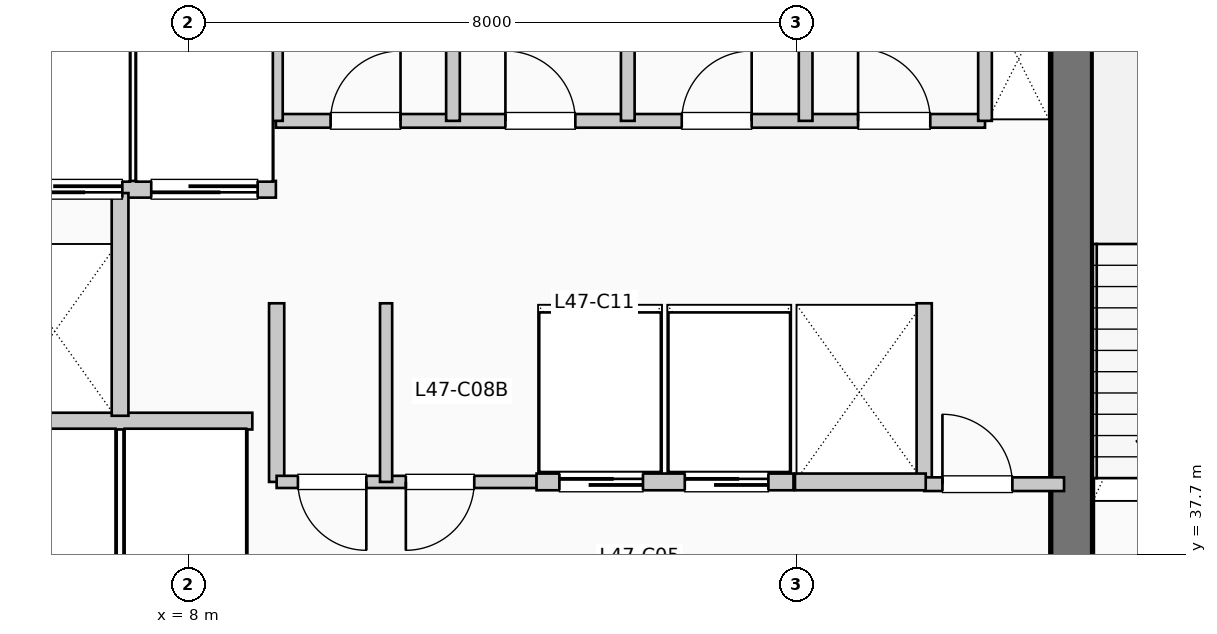
"""IFC4 building model, lengths in metres.
Left out: names, types, materials, properties, quantities, classifications, styles, units other than length and angle.
Written with IfcOpenShell. Run it as: python <this file> out.ifc"""

import sys

from ifc_helpers import new_model, si_unit, direction, frame, frame_2d, origin, place, context, subcontext, project, spatial, rectangle, extrude, element, fill, save


model = new_model("IFC4")
c1 = context("Model", 3, precision=1e-05, world=origin(), true_north=direction((0.0, 1.0)))
c2 = subcontext(c1, "Body", "Model", "MODEL_VIEW")
j1 = project(units=[si_unit("LENGTHUNIT", "METRE"), si_unit("PLANEANGLEUNIT", "RADIAN")], contexts=[c1])
p1 = place(None, origin())
s1 = spatial("IfcSite", under=j1, at=p1, CompositionType="ELEMENT")
p2 = place(p1, origin())
s2 = spatial("IfcBuilding", under=s1, at=p2, CompositionType="ELEMENT")
p3 = place(p2, frame((0.0, 0.0, 195.36)))
s3 = spatial("IfcBuildingStorey", under=s2, at=p3, CompositionType="ELEMENT", Elevation=195.36)
p4 = place(p3, frame((19.62, 37.15, 0.0), z_axis=(0.0, 0.0, 1.0), x_axis=(0.0, 1.0, 0.0)))
e1 = element("IfcWall", 1, at=p4, inside=s3, PredefinedType="SHEAR", context=c2, shape_type="SweptSolid", body=[
    extrude(rectangle(XDim=7.89, YDim=0.55, at=frame_2d((3.945, 0.0))), origin(), (0.0, 0.0, 1.0), 3.96),
])
p5 = place(p3, frame((5.38, 39.45, 0.0), z_axis=(0.0, 0.0, 1.0), x_axis=(1.0, 0.0, 0.0)))
e2 = element("IfcWall", 2, at=p5, inside=s3, PredefinedType="PARTITIONING", context=c2, shape_type="SweptSolid", body=[
    extrude(rectangle(XDim=3.46, YDim=0.22, at=frame_2d((1.73, 0.0))), origin(), (0.0, 0.0, 1.0), 3.71),
])
p6 = place(p3, frame((5.38, 42.5, 0.0), z_axis=(0.0, 0.0, 1.0), x_axis=(1.0, 0.0, 0.0)))
e3 = element("IfcWall", 3, at=p6, inside=s3, PredefinedType="PARTITIONING", context=c2, shape_type="SweptSolid", body=[
    extrude(rectangle(XDim=3.77, YDim=0.22, at=frame_2d((1.885, 0.0))), origin(), (0.0, 0.0, 1.0), 3.71),
])
p7 = place(p6, frame((1.75, 0.0, 0.0), z_axis=(0.0, 0.0, 1.0), x_axis=(-1.0, 0.0, 0.0)))
e4 = element("IfcOpeningElement", 4, at=p7, cuts=e3, PredefinedType="OPENING", context=c2, shape_type="SweptSolid", body=[
    extrude(rectangle(XDim=1.4, YDim=2.2, at=frame_2d((0.7, 1.1))), frame((0.0, 0.12, 0.0), z_axis=(0.0, -1.0, 0.0), x_axis=(1.0, 0.0, 0.0)), (0.0, 0.0, 1.0), 0.24),
])
p8 = place(p6, frame((3.53, 0.0, 0.0), z_axis=(0.0, 0.0, 1.0), x_axis=(-1.0, 0.0, 0.0)))
e5 = element("IfcOpeningElement", 5, at=p8, cuts=e3, PredefinedType="OPENING", context=c2, shape_type="SweptSolid", body=[
    extrude(rectangle(XDim=1.4, YDim=2.2, at=frame_2d((0.7, 1.1))), frame((0.0, 0.12, 0.0), z_axis=(0.0, -1.0, 0.0), x_axis=(1.0, 0.0, 0.0)), (0.0, 0.0, 1.0), 0.24),
])
p9 = place(p3, frame((7.1, 39.52, 0.0), z_axis=(0.0, 0.0, 1.0), x_axis=(0.0, 1.0, 0.0)))
e6 = element("IfcWall", 6, at=p9, inside=s3, PredefinedType="PARTITIONING", context=c2, shape_type="SweptSolid", body=[
    extrude(rectangle(XDim=2.93, YDim=0.22, at=frame_2d((1.465, 0.0))), origin(), (0.0, 0.0, 1.0), 3.71),
])
for number, where, z_axis, x_axis in (
    (7, (9.16, 38.65, 0.0), (0.0, 0.0, 1.0), (0.0, 1.0, 0.0)),
    (8, (17.68, 38.65, 0.0), (0.0, 0.0, 1.0), (0.0, 1.0, 0.0)),
):
    element("IfcWall", number, at=place(p3, frame(where, z_axis=z_axis, x_axis=x_axis)), inside=s3, PredefinedType="PARTITIONING", context=c2, shape_type="SweptSolid", body=[
        extrude(rectangle(XDim=2.35, YDim=0.2, at=frame_2d((1.175, 0.0))), origin(), (0.0, 0.0, 1.0), 3.71),
    ])
p10 = place(p3, frame((17.68, 38.62, 0.0), z_axis=(0.0, 0.0, 1.0), x_axis=(1.0, 0.0, 0.0)))
e9 = element("IfcWall", 9, at=p10, inside=s3, PredefinedType="PARTITIONING", context=c2, shape_type="SweptSolid", body=[
    extrude(rectangle(XDim=1.84, YDim=0.18, at=frame_2d((0.92, 0.0))), origin(), (0.0, 0.0, 1.0), 3.71),
])
p11 = place(p10, frame((0.24, 0.0, 0.0)))
e10 = element("IfcOpeningElement", 10, at=p11, cuts=e9, PredefinedType="OPENING", context=c2, shape_type="SweptSolid", body=[
    extrude(rectangle(XDim=0.92, YDim=2.1, at=frame_2d((0.46, 1.05))), frame((0.0, 0.1, 0.0), z_axis=(0.0, -1.0, 0.0), x_axis=(1.0, 0.0, 0.0)), (0.0, 0.0, 1.0), 0.2),
])
p12 = place(p3, frame((9.16, 38.65, 0.0), z_axis=(0.0, 0.0, 1.0), x_axis=(1.0, 0.0, 0.0)))
e11 = element("IfcWall", 11, at=p12, inside=s3, PredefinedType="PARTITIONING", context=c2, shape_type="SweptSolid", body=[
    extrude(rectangle(XDim=3.42, YDim=0.16, at=frame_2d((1.71, 0.0))), origin(), (0.0, 0.0, 1.0), 3.71),
])
p13 = place(p12, frame((1.18, 0.0, 0.0), z_axis=(0.0, 0.0, 1.0), x_axis=(-1.0, 0.0, 0.0)))
e12 = element("IfcOpeningElement", 12, at=p13, cuts=e11, PredefinedType="OPENING", context=c2, shape_type="SweptSolid", body=[
    extrude(rectangle(XDim=0.9, YDim=2.15, at=frame_2d((0.45, 1.075))), frame((0.0, 0.09, 0.0), z_axis=(0.0, -1.0, 0.0), x_axis=(1.0, 0.0, 0.0)), (0.0, 0.0, 1.0), 0.18),
])
p14 = place(p12, frame((2.6, 0.0, 0.0), z_axis=(0.0, 0.0, 1.0), x_axis=(-1.0, 0.0, 0.0)))
e13 = element("IfcOpeningElement", 13, at=p14, cuts=e11, PredefinedType="OPENING", context=c2, shape_type="SweptSolid", body=[
    extrude(rectangle(XDim=0.9, YDim=2.15, at=frame_2d((0.45, 1.075))), frame((0.0, 0.09, 0.0), z_axis=(0.0, -1.0, 0.0), x_axis=(1.0, 0.0, 0.0)), (0.0, 0.0, 1.0), 0.18),
])
p15 = place(p3, frame((10.6, 38.65, 0.0), z_axis=(0.0, 0.0, 1.0), x_axis=(0.0, 1.0, 0.0)))
e14 = element("IfcWall", 14, at=p15, inside=s3, PredefinedType="PARTITIONING", context=c2, shape_type="SweptSolid", body=[
    extrude(rectangle(XDim=2.35, YDim=0.16, at=frame_2d((1.175, 0.0))), origin(), (0.0, 0.0, 1.0), 3.71),
])
p16 = place(p3, frame((12.58, 38.65, 0.0), z_axis=(0.0, 0.0, 1.0), x_axis=(1.0, 0.0, 0.0)))
e15 = element("IfcWall", 15, at=p16, inside=s3, PredefinedType="PARTITIONING", context=c2, shape_type="SweptSolid", body=[
    extrude(rectangle(XDim=3.38, YDim=0.22, at=frame_2d((1.69, 0.0))), origin(), (0.0, 0.0, 1.0), 3.71),
])
p17 = place(p16, frame((0.3, 0.0, 0.0)))
e16 = element("IfcOpeningElement", 16, at=p17, cuts=e15, PredefinedType="OPENING", context=c2, shape_type="SweptSolid", body=[
    extrude(rectangle(XDim=1.1, YDim=2.2, at=frame_2d((0.55, 1.1))), frame((0.0, 0.12, 0.0), z_axis=(0.0, -1.0, 0.0), x_axis=(1.0, 0.0, 0.0)), (0.0, 0.0, 1.0), 0.24),
])
p18 = place(p16, frame((1.95, 0.0, 0.0)))
e17 = element("IfcOpeningElement", 17, at=p18, cuts=e15, PredefinedType="OPENING", context=c2, shape_type="SweptSolid", body=[
    extrude(rectangle(XDim=1.1, YDim=2.2, at=frame_2d((0.55, 1.1))), frame((0.0, 0.12, 0.0), z_axis=(0.0, -1.0, 0.0), x_axis=(1.0, 0.0, 0.0)), (0.0, 0.0, 1.0), 0.24),
])
p19 = place(p3, frame((15.98, 38.65, 0.0), z_axis=(0.0, 0.0, 1.0), x_axis=(1.0, 0.0, 0.0)))
e18 = element("IfcWall", 18, at=p19, inside=s3, PredefinedType="PARTITIONING", context=c2, shape_type="SweptSolid", body=[
    extrude(rectangle(XDim=1.72, YDim=0.22, at=frame_2d((0.86, 0.0))), origin(), (0.0, 0.0, 1.0), 3.71),
])
p20 = place(p3, frame((9.15, 43.4, 0.0), z_axis=(0.0, 0.0, 1.0), x_axis=(1.0, 0.0, 0.0)))
e19 = element("IfcWall", 19, at=p20, inside=s3, PredefinedType="PLUMBINGWALL", context=c2, shape_type="SweptSolid", body=[
    extrude(rectangle(XDim=9.33, YDim=0.18, at=frame_2d((4.665, 0.0))), origin(), (0.0, 0.0, 1.0), 3.71),
])
p21 = place(p20, frame((0.72, 0.0, 0.0)))
e20 = element("IfcOpeningElement", 20, at=p21, cuts=e19, PredefinedType="OPENING", context=c2, shape_type="SweptSolid", body=[
    extrude(rectangle(XDim=0.92, YDim=2.1, at=frame_2d((0.46, 1.05))), frame((0.0, 0.1, 0.0), z_axis=(0.0, -1.0, 0.0), x_axis=(1.0, 0.0, 0.0)), (0.0, 0.0, 1.0), 0.2),
])
p22 = place(p20, frame((3.02, 0.0, 0.0)))
e21 = element("IfcOpeningElement", 21, at=p22, cuts=e19, PredefinedType="OPENING", context=c2, shape_type="SweptSolid", body=[
    extrude(rectangle(XDim=0.92, YDim=2.1, at=frame_2d((0.46, 1.05))), frame((0.0, 0.1, 0.0), z_axis=(0.0, -1.0, 0.0), x_axis=(1.0, 0.0, 0.0)), (0.0, 0.0, 1.0), 0.2),
])
p23 = place(p20, frame((5.34, 0.0, 0.0)))
e22 = element("IfcOpeningElement", 22, at=p23, cuts=e19, PredefinedType="OPENING", context=c2, shape_type="SweptSolid", body=[
    extrude(rectangle(XDim=0.92, YDim=2.1, at=frame_2d((0.46, 1.05))), frame((0.0, 0.1, 0.0), z_axis=(0.0, -1.0, 0.0), x_axis=(1.0, 0.0, 0.0)), (0.0, 0.0, 1.0), 0.2),
])
p24 = place(p20, frame((7.66, 0.0, 0.0)))
e23 = element("IfcOpeningElement", 23, at=p24, cuts=e19, PredefinedType="OPENING", context=c2, shape_type="SweptSolid", body=[
    extrude(rectangle(XDim=0.95, YDim=2.1, at=frame_2d((0.475, 1.05))), frame((0.0, 0.1, 0.0), z_axis=(0.0, -1.0, 0.0), x_axis=(1.0, 0.0, 0.0)), (0.0, 0.0, 1.0), 0.2),
])
for number, where, z_axis, x_axis in (
    (24, (9.15, 43.4, 0.0), (0.0, 0.0, 1.0), (0.0, 1.0, 0.0)),
    (25, (18.48, 43.4, 0.0), (0.0, 0.0, 1.0), (0.0, 1.0, 0.0)),
    (26, (11.48, 43.4, 0.0), (0.0, 0.0, 1.0), (0.0, 1.0, 0.0)),
    (27, (13.78, 43.4, 0.0), (0.0, 0.0, 1.0), (0.0, 1.0, 0.0)),
    (28, (16.12, 43.4, 0.0), (0.0, 0.0, 1.0), (0.0, 1.0, 0.0)),
):
    element("IfcWall", number, at=place(p3, frame(where, z_axis=z_axis, x_axis=x_axis)), inside=s3, PredefinedType="PLUMBINGWALL", context=c2, shape_type="SweptSolid", body=[
        extrude(rectangle(XDim=1.88, YDim=0.18, at=frame_2d((0.94, 0.0))), origin(), (0.0, 0.0, 1.0), 3.71),
    ])
p25 = place(p7, origin())
e29 = element("IfcDoor", 29, at=p25, inside=s3, OperationType="SLIDING_TO_LEFT", PredefinedType="DOOR", context=c2, shape_type="SweptSolid", body=[
    extrude(rectangle(XDim=1.4, YDim=2.2, at=frame_2d((0.7, 1.1))), frame((0.0, 0.025, 0.0), z_axis=(0.0, -1.0, 0.0), x_axis=(1.0, 0.0, 0.0)), (0.0, 0.0, 1.0), 0.05),
])
fill(e4, e29)
p26 = place(p8, origin())
e30 = element("IfcDoor", 30, at=p26, inside=s3, OperationType="SLIDING_TO_LEFT", PredefinedType="DOOR", context=c2, shape_type="SweptSolid", body=[
    extrude(rectangle(XDim=1.4, YDim=2.2, at=frame_2d((0.7, 1.1))), frame((0.0, 0.025, 0.0), z_axis=(0.0, -1.0, 0.0), x_axis=(1.0, 0.0, 0.0)), (0.0, 0.0, 1.0), 0.05),
])
fill(e5, e30)
p27 = place(p11, origin())
e31 = element("IfcDoor", 31, at=p27, inside=s3, OperationType="SINGLE_SWING_LEFT", PredefinedType="DOOR", context=c2, shape_type="SweptSolid", body=[
    extrude(rectangle(XDim=0.92, YDim=2.1, at=frame_2d((0.46, 1.05))), frame((0.0, 0.025, 0.0), z_axis=(0.0, -1.0, 0.0), x_axis=(1.0, 0.0, 0.0)), (0.0, 0.0, 1.0), 0.05),
])
fill(e10, e31)
p28 = place(p13, origin())
e32 = element("IfcDoor", 32, at=p28, inside=s3, OperationType="SINGLE_SWING_RIGHT", PredefinedType="DOOR", context=c2, shape_type="SweptSolid", body=[
    extrude(rectangle(XDim=0.9, YDim=2.15, at=frame_2d((0.45, 1.075))), frame((0.0, 0.025, 0.0), z_axis=(0.0, -1.0, 0.0), x_axis=(1.0, 0.0, 0.0)), (0.0, 0.0, 1.0), 0.05),
])
fill(e12, e32)
p29 = place(p14, origin())
e33 = element("IfcDoor", 33, at=p29, inside=s3, OperationType="SINGLE_SWING_LEFT", PredefinedType="DOOR", context=c2, shape_type="SweptSolid", body=[
    extrude(rectangle(XDim=0.9, YDim=2.15, at=frame_2d((0.45, 1.075))), frame((0.0, 0.025, 0.0), z_axis=(0.0, -1.0, 0.0), x_axis=(1.0, 0.0, 0.0)), (0.0, 0.0, 1.0), 0.05),
])
fill(e13, e33)
p30 = place(p17, origin())
e34 = element("IfcDoor", 34, at=p30, inside=s3, OperationType="SLIDING_TO_RIGHT", PredefinedType="DOOR", context=c2, shape_type="SweptSolid", body=[
    extrude(rectangle(XDim=1.1, YDim=2.2, at=frame_2d((0.55, 1.1))), frame((0.0, 0.025, 0.0), z_axis=(0.0, -1.0, 0.0), x_axis=(1.0, 0.0, 0.0)), (0.0, 0.0, 1.0), 0.05),
])
fill(e16, e34)
p31 = place(p18, origin())
e35 = element("IfcDoor", 35, at=p31, inside=s3, OperationType="SLIDING_TO_RIGHT", PredefinedType="DOOR", context=c2, shape_type="SweptSolid", body=[
    extrude(rectangle(XDim=1.1, YDim=2.2, at=frame_2d((0.55, 1.1))), frame((0.0, 0.025, 0.0), z_axis=(0.0, -1.0, 0.0), x_axis=(1.0, 0.0, 0.0)), (0.0, 0.0, 1.0), 0.05),
])
fill(e17, e35)
p32 = place(p21, origin())
e36 = element("IfcDoor", 36, at=p32, inside=s3, OperationType="SINGLE_SWING_RIGHT", PredefinedType="DOOR", context=c2, shape_type="SweptSolid", body=[
    extrude(rectangle(XDim=0.92, YDim=2.1, at=frame_2d((0.46, 1.05))), frame((0.0, 0.025, 0.0), z_axis=(0.0, -1.0, 0.0), x_axis=(1.0, 0.0, 0.0)), (0.0, 0.0, 1.0), 0.05),
])
fill(e20, e36)
p33 = place(p22, origin())
e37 = element("IfcDoor", 37, at=p33, inside=s3, OperationType="SINGLE_SWING_LEFT", PredefinedType="DOOR", context=c2, shape_type="SweptSolid", body=[
    extrude(rectangle(XDim=0.92, YDim=2.1, at=frame_2d((0.46, 1.05))), frame((0.0, 0.025, 0.0), z_axis=(0.0, -1.0, 0.0), x_axis=(1.0, 0.0, 0.0)), (0.0, 0.0, 1.0), 0.05),
])
fill(e21, e37)
p34 = place(p23, origin())
e38 = element("IfcDoor", 38, at=p34, inside=s3, OperationType="SINGLE_SWING_RIGHT", PredefinedType="DOOR", context=c2, shape_type="SweptSolid", body=[
    extrude(rectangle(XDim=0.92, YDim=2.1, at=frame_2d((0.46, 1.05))), frame((0.0, 0.025, 0.0), z_axis=(0.0, -1.0, 0.0), x_axis=(1.0, 0.0, 0.0)), (0.0, 0.0, 1.0), 0.05),
])
fill(e22, e38)
p35 = place(p24, origin())
e39 = element("IfcDoor", 39, at=p35, inside=s3, OperationType="SINGLE_SWING_LEFT", PredefinedType="DOOR", context=c2, shape_type="SweptSolid", body=[
    extrude(rectangle(XDim=0.95, YDim=2.1, at=frame_2d((0.475, 1.05))), frame((0.0, 0.025, 0.0), z_axis=(0.0, -1.0, 0.0), x_axis=(1.0, 0.0, 0.0)), (0.0, 0.0, 1.0), 0.05),
])
fill(e23, e39)
save(model, sys.argv[1])
